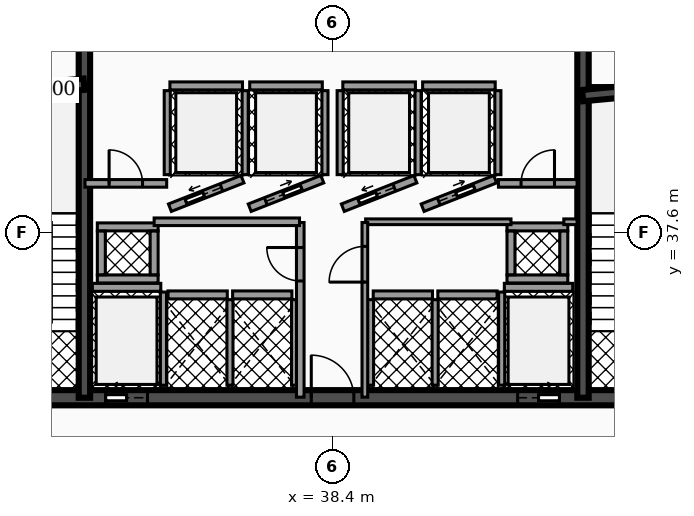
"""IFC4 building model, lengths in metres.
Left out: names, types, materials, properties, quantities, classifications, styles, units other than length and angle.
Written with IfcOpenShell. Run it as: python <this file> out.ifc"""

import sys

from ifc_helpers import new_model, si_unit, direction, frame, frame_2d, origin, place, context, subcontext, project, spatial, rectangle, extrude, element, fill, save


model = new_model("IFC4")
c1 = context("Model", 3, precision=1e-05, world=origin(), true_north=direction((0.0, 1.0)))
c2 = subcontext(c1, "Body", "Model", "MODEL_VIEW")
j1 = project(units=[si_unit("LENGTHUNIT", "METRE"), si_unit("PLANEANGLEUNIT", "RADIAN")], contexts=[c1])
p1 = place(None, origin())
s1 = spatial("IfcSite", under=j1, at=p1, CompositionType="ELEMENT")
p2 = place(p1, origin())
s2 = spatial("IfcBuilding", under=s1, at=p2, CompositionType="ELEMENT")
p3 = place(p2, frame((0.0, 0.0, 88.74)))
s3 = spatial("IfcBuildingStorey", under=s2, at=p3, CompositionType="ELEMENT", Elevation=88.74)
p4 = place(p3, frame((28.4, 33.25, 0.0), z_axis=(0.0, 0.0, 1.0), x_axis=(1.0, 0.0, 0.0)))
e1 = element("IfcWall", 1, at=p4, inside=s3, PredefinedType="SHEAR", context=c2, shape_type="SweptSolid", body=[
    extrude(rectangle(XDim=20.06, YDim=0.4, at=frame_2d((10.03, 0.0))), origin(), (0.0, 0.0, 1.0), 3.82),
])
p5 = place(p4, frame((4.03, 0.0, 0.0)))
e2 = element("IfcOpeningElement", 2, at=p5, cuts=e1, PredefinedType="OPENING", context=c2, shape_type="SweptSolid", body=[
    extrude(rectangle(XDim=1.1, YDim=2.15, at=frame_2d((0.55, 1.075))), frame((0.0, 0.21, 0.0), z_axis=(0.0, -1.0, 0.0), x_axis=(1.0, 0.0, 0.0)), (0.0, 0.0, 1.0), 0.42),
])
p6 = place(p4, frame((14.87, 0.0, 0.0)))
e3 = element("IfcOpeningElement", 3, at=p6, cuts=e1, PredefinedType="OPENING", context=c2, shape_type="SweptSolid", body=[
    extrude(rectangle(XDim=1.1, YDim=2.15, at=frame_2d((0.55, 1.075))), frame((0.0, 0.21, 0.0), z_axis=(0.0, -1.0, 0.0), x_axis=(1.0, 0.0, 0.0)), (0.0, 0.0, 1.0), 0.42),
])
p7 = place(p4, frame((1.31, 0.0, 0.0)))
e4 = element("IfcOpeningElement", 4, at=p7, cuts=e1, PredefinedType="OPENING", context=c2, shape_type="SweptSolid", body=[
    extrude(rectangle(XDim=1.1, YDim=2.2, at=frame_2d((0.55, 1.1))), frame((0.0, 0.21, 0.0), z_axis=(0.0, -1.0, 0.0), x_axis=(1.0, 0.0, 0.0)), (0.0, 0.0, 1.0), 0.42),
])
p8 = place(p4, frame((9.44, 0.0, 0.0)))
e5 = element("IfcOpeningElement", 5, at=p8, cuts=e1, PredefinedType="OPENING", context=c2, shape_type="SweptSolid", body=[
    extrude(rectangle(XDim=1.12, YDim=2.05, at=frame_2d((0.56, 1.025))), frame((0.0, 0.21, 0.0), z_axis=(0.0, -1.0, 0.0), x_axis=(1.0, 0.0, 0.0)), (0.0, 0.0, 1.0), 0.42),
])
p9 = place(p4, frame((17.65, 0.0, 0.0)))
e6 = element("IfcOpeningElement", 6, at=p9, cuts=e1, PredefinedType="OPENING", context=c2, shape_type="SweptSolid", body=[
    extrude(rectangle(XDim=1.1, YDim=2.2, at=frame_2d((0.55, 1.1))), frame((0.0, 0.21, 0.0), z_axis=(0.0, -1.0, 0.0), x_axis=(1.0, 0.0, 0.0)), (0.0, 0.0, 1.0), 0.42),
])
for number, where, z_axis, x_axis in (
    (7, (31.87, 33.25, 0.0), (0.0, 0.0, 1.0), (0.0, 1.0, 0.0)),
    (8, (44.99, 33.25, 0.0), (0.0, 0.0, 1.0), (0.0, 1.0, 0.0)),
):
    element("IfcWall", number, at=place(p3, frame(where, z_axis=z_axis, x_axis=x_axis)), inside=s3, PredefinedType="SHEAR", context=c2, shape_type="SweptSolid", body=[
        extrude(rectangle(XDim=10.2, YDim=0.3, at=frame_2d((5.1, 0.0))), origin(), (0.0, 0.0, 1.0), 3.82),
    ])
p10 = place(p3, frame((28.64, 41.2, 0.0), z_axis=(0.0, 0.0, 1.0), x_axis=(0.995687118776, 0.092774789157, 0.0)))
e9 = element("IfcWall", 9, at=p10, inside=s3, PredefinedType="SHEAR", context=c2, shape_type="SweptSolid", body=[
    extrude(rectangle(XDim=3.234, YDim=0.3, at=frame_2d((1.617, 0.0))), origin(), (0.0, 0.0, 1.0), 3.82),
])
p11 = place(p3, frame((44.98, 41.2, 0.0), z_axis=(0.0, 0.0, 1.0), x_axis=(0.995686468965, 0.09278176286, 0.0)))
e10 = element("IfcWall", 10, at=p11, inside=s3, PredefinedType="SHEAR", context=c2, shape_type="SweptSolid", body=[
    extrude(rectangle(XDim=3.234, YDim=0.3, at=frame_2d((1.617, 0.0))), origin(), (0.0, 0.0, 1.0), 3.82),
])
p12 = place(p3, frame((32.08, 36.155, 0.0), z_axis=(0.0, 0.0, 1.0), x_axis=(1.0, 0.0, 0.0)))
e11 = element("IfcWall", 11, at=p12, inside=s3, PredefinedType="SOLIDWALL", context=c2, shape_type="SweptSolid", body=[
    extrude(rectangle(XDim=1.8, YDim=0.21, at=frame_2d((0.9, 0.0))), origin(), (0.0, 0.0, 1.0), 2.792),
])
p13 = place(p3, frame((33.95, 33.58, 0.0), z_axis=(0.0, 0.0, 1.0), x_axis=(0.0, 1.0, 0.0)))
e12 = element("IfcWall", 12, at=p13, inside=s3, PredefinedType="SOLIDWALL", context=c2, shape_type="SweptSolid", body=[
    extrude(rectangle(XDim=2.45, YDim=0.16, at=frame_2d((1.225, 0.0))), origin(), (0.0, 0.0, 1.0), 2.792),
])
p14 = place(p3, frame((42.92, 36.155, 0.0), z_axis=(0.0, 0.0, 1.0), x_axis=(1.0, 0.0, 0.0)))
e13 = element("IfcWall", 13, at=p14, inside=s3, PredefinedType="SOLIDWALL", context=c2, shape_type="SweptSolid", body=[
    extrude(rectangle(XDim=1.8, YDim=0.21, at=frame_2d((0.9, 0.0))), origin(), (0.0, 0.0, 1.0), 2.792),
])
p15 = place(p3, frame((42.85, 33.58, 0.0), z_axis=(0.0, 0.0, 1.0), x_axis=(0.0, 1.0, 0.0)))
e14 = element("IfcWall", 14, at=p15, inside=s3, PredefinedType="SOLIDWALL", context=c2, shape_type="SweptSolid", body=[
    extrude(rectangle(XDim=2.45, YDim=0.16, at=frame_2d((1.225, 0.0))), origin(), (0.0, 0.0, 1.0), 2.792),
])
p16 = place(p3, frame((34.12, 38.25, 0.0), z_axis=(0.0, 0.0, 1.0), x_axis=(0.930804993012, 0.36551616241, 0.0)))
e15 = element("IfcWall", 15, at=p16, inside=s3, PredefinedType="SOLIDWALL", context=c2, shape_type="SweptSolid", body=[
    extrude(rectangle(XDim=2.052, YDim=0.21, at=frame_2d((1.026, 0.0))), origin(), (0.0, 0.0, 1.0), 2.792),
])
p17 = place(p16, frame((0.455, 0.0, 0.0)))
e16 = element("IfcOpeningElement", 16, at=p17, cuts=e15, PredefinedType="OPENING", context=c2, shape_type="SweptSolid", body=[
    extrude(rectangle(XDim=1.0, YDim=2.1, at=frame_2d((0.5, 1.05))), frame((0.0, 0.115, 0.0), z_axis=(0.0, -1.0, 0.0), x_axis=(1.0, 0.0, 0.0)), (0.0, 0.0, 1.0), 0.23),
])
p18 = place(p3, frame((34.12, 41.455, 0.0), z_axis=(0.0, 0.0, 1.0), x_axis=(1.0, 0.0, 0.0)))
e17 = element("IfcWall", 17, at=p18, inside=s3, PredefinedType="SOLIDWALL", context=c2, shape_type="SweptSolid", body=[
    extrude(rectangle(XDim=1.91, YDim=0.21, at=frame_2d((0.955, 0.0))), origin(), (0.0, 0.0, 1.0), 2.792),
])
for number, where, z_axis, x_axis in (
    (18, (34.05, 39.12, 0.0), (0.0, 0.0, 1.0), (0.0, 1.0, 0.0)),
    (19, (36.1, 39.12, 0.0), (0.0, 0.0, 1.0), (0.0, 1.0, 0.0)),
):
    element("IfcWall", number, at=place(p3, frame(where, z_axis=z_axis, x_axis=x_axis)), inside=s3, PredefinedType="SOLIDWALL", context=c2, shape_type="SweptSolid", body=[
        extrude(rectangle(XDim=2.21, YDim=0.16, at=frame_2d((1.105, 0.0))), origin(), (0.0, 0.0, 1.0), 2.792),
    ])
p19 = place(p3, frame((36.22, 38.25, 0.0), z_axis=(0.0, 0.0, 1.0), x_axis=(0.930804993012, 0.36551616241, 0.0)))
e20 = element("IfcWall", 20, at=p19, inside=s3, PredefinedType="SOLIDWALL", context=c2, shape_type="SweptSolid", body=[
    extrude(rectangle(XDim=2.052, YDim=0.21, at=frame_2d((1.026, 0.0))), origin(), (0.0, 0.0, 1.0), 2.792),
])
p20 = place(p19, frame((0.455, 0.0, 0.0)))
e21 = element("IfcOpeningElement", 21, at=p20, cuts=e20, PredefinedType="OPENING", context=c2, shape_type="SweptSolid", body=[
    extrude(rectangle(XDim=1.0, YDim=2.1, at=frame_2d((0.5, 1.05))), frame((0.0, 0.115, 0.0), z_axis=(0.0, -1.0, 0.0), x_axis=(1.0, 0.0, 0.0)), (0.0, 0.0, 1.0), 0.23),
])
p21 = place(p3, frame((36.22, 41.455, 0.0), z_axis=(0.0, 0.0, 1.0), x_axis=(1.0, 0.0, 0.0)))
e22 = element("IfcWall", 22, at=p21, inside=s3, PredefinedType="SOLIDWALL", context=c2, shape_type="SweptSolid", body=[
    extrude(rectangle(XDim=1.91, YDim=0.21, at=frame_2d((0.955, 0.0))), origin(), (0.0, 0.0, 1.0), 2.792),
])
p22 = place(p3, frame((38.2, 39.12, 0.0), z_axis=(0.0, 0.0, 1.0), x_axis=(0.0, 1.0, 0.0)))
e23 = element("IfcWall", 23, at=p22, inside=s3, PredefinedType="SOLIDWALL", context=c2, shape_type="SweptSolid", body=[
    extrude(rectangle(XDim=2.21, YDim=0.16, at=frame_2d((1.105, 0.0))), origin(), (0.0, 0.0, 1.0), 2.792),
])
p23 = place(p3, frame((38.67, 38.25, 0.0), z_axis=(0.0, 0.0, 1.0), x_axis=(0.930820886763, 0.3654756856, 0.0)))
e24 = element("IfcWall", 24, at=p23, inside=s3, PredefinedType="SOLIDWALL", context=c2, shape_type="SweptSolid", body=[
    extrude(rectangle(XDim=2.052, YDim=0.21, at=frame_2d((1.026, 0.0))), origin(), (0.0, 0.0, 1.0), 2.792),
])
p24 = place(p23, frame((0.455, 0.0, 0.0)))
e25 = element("IfcOpeningElement", 25, at=p24, cuts=e24, PredefinedType="OPENING", context=c2, shape_type="SweptSolid", body=[
    extrude(rectangle(XDim=1.0, YDim=2.1, at=frame_2d((0.5, 1.05))), frame((0.0, 0.115, 0.0), z_axis=(0.0, -1.0, 0.0), x_axis=(1.0, 0.0, 0.0)), (0.0, 0.0, 1.0), 0.23),
])
p25 = place(p3, frame((38.67, 41.455, 0.0), z_axis=(0.0, 0.0, 1.0), x_axis=(1.0, 0.0, 0.0)))
e26 = element("IfcWall", 26, at=p25, inside=s3, PredefinedType="SOLIDWALL", context=c2, shape_type="SweptSolid", body=[
    extrude(rectangle(XDim=1.91, YDim=0.21, at=frame_2d((0.955, 0.0))), origin(), (0.0, 0.0, 1.0), 2.792),
])
for number, where, z_axis, x_axis in (
    (27, (38.6, 39.12, 0.0), (0.0, 0.0, 1.0), (0.0, 1.0, 0.0)),
    (28, (40.65, 39.12, 0.0), (0.0, 0.0, 1.0), (0.0, 1.0, 0.0)),
):
    element("IfcWall", number, at=place(p3, frame(where, z_axis=z_axis, x_axis=x_axis)), inside=s3, PredefinedType="SOLIDWALL", context=c2, shape_type="SweptSolid", body=[
        extrude(rectangle(XDim=2.21, YDim=0.16, at=frame_2d((1.105, 0.0))), origin(), (0.0, 0.0, 1.0), 2.792),
    ])
p26 = place(p3, frame((40.77, 38.25, 0.0), z_axis=(0.0, 0.0, 1.0), x_axis=(0.930804993012, 0.36551616241, 0.0)))
e29 = element("IfcWall", 29, at=p26, inside=s3, PredefinedType="SOLIDWALL", context=c2, shape_type="SweptSolid", body=[
    extrude(rectangle(XDim=2.052, YDim=0.21, at=frame_2d((1.026, 0.0))), origin(), (0.0, 0.0, 1.0), 2.792),
])
p27 = place(p26, frame((0.455, 0.0, 0.0)))
e30 = element("IfcOpeningElement", 30, at=p27, cuts=e29, PredefinedType="OPENING", context=c2, shape_type="SweptSolid", body=[
    extrude(rectangle(XDim=1.0, YDim=2.1, at=frame_2d((0.5, 1.05))), frame((0.0, 0.115, 0.0), z_axis=(0.0, -1.0, 0.0), x_axis=(1.0, 0.0, 0.0)), (0.0, 0.0, 1.0), 0.23),
])
p28 = place(p3, frame((40.77, 41.455, 0.0), z_axis=(0.0, 0.0, 1.0), x_axis=(1.0, 0.0, 0.0)))
e31 = element("IfcWall", 31, at=p28, inside=s3, PredefinedType="SOLIDWALL", context=c2, shape_type="SweptSolid", body=[
    extrude(rectangle(XDim=1.91, YDim=0.21, at=frame_2d((0.955, 0.0))), origin(), (0.0, 0.0, 1.0), 2.792),
])
p29 = place(p3, frame((42.75, 39.12, 0.0), z_axis=(0.0, 0.0, 1.0), x_axis=(0.0, 1.0, 0.0)))
e32 = element("IfcWall", 32, at=p29, inside=s3, PredefinedType="SOLIDWALL", context=c2, shape_type="SweptSolid", body=[
    extrude(rectangle(XDim=2.21, YDim=0.16, at=frame_2d((1.105, 0.0))), origin(), (0.0, 0.0, 1.0), 2.792),
])
p30 = place(p3, frame((34.07, 35.955, 0.0), z_axis=(0.0, 0.0, 1.0), x_axis=(1.0, 0.0, 0.0)))
e33 = element("IfcWall", 33, at=p30, inside=s3, PredefinedType="SOLIDWALL", context=c2, shape_type="SweptSolid", body=[
    extrude(rectangle(XDim=1.56, YDim=0.21, at=frame_2d((0.78, 0.0))), origin(), (0.0, 0.0, 1.0), 2.792),
])
p31 = place(p3, frame((35.7, 33.58, 0.0), z_axis=(0.0, 0.0, 1.0), x_axis=(0.0, 1.0, 0.0)))
e34 = element("IfcWall", 34, at=p31, inside=s3, PredefinedType="SOLIDWALL", context=c2, shape_type="SweptSolid", body=[
    extrude(rectangle(XDim=2.25, YDim=0.16, at=frame_2d((1.125, 0.0))), origin(), (0.0, 0.0, 1.0), 2.792),
])
p32 = place(p3, frame((35.77, 35.955, 0.0), z_axis=(0.0, 0.0, 1.0), x_axis=(1.0, 0.0, 0.0)))
e35 = element("IfcWall", 35, at=p32, inside=s3, PredefinedType="SOLIDWALL", context=c2, shape_type="SweptSolid", body=[
    extrude(rectangle(XDim=1.56, YDim=0.21, at=frame_2d((0.78, 0.0))), origin(), (0.0, 0.0, 1.0), 2.792),
])
p33 = place(p3, frame((37.4, 33.58, 0.0), z_axis=(0.0, 0.0, 1.0), x_axis=(0.0, 1.0, 0.0)))
e36 = element("IfcWall", 36, at=p33, inside=s3, PredefinedType="SOLIDWALL", context=c2, shape_type="SweptSolid", body=[
    extrude(rectangle(XDim=2.25, YDim=0.16, at=frame_2d((1.125, 0.0))), origin(), (0.0, 0.0, 1.0), 2.792),
])
p34 = place(p3, frame((39.47, 35.955, 0.0), z_axis=(0.0, 0.0, 1.0), x_axis=(1.0, 0.0, 0.0)))
e37 = element("IfcWall", 37, at=p34, inside=s3, PredefinedType="SOLIDWALL", context=c2, shape_type="SweptSolid", body=[
    extrude(rectangle(XDim=1.56, YDim=0.21, at=frame_2d((0.78, 0.0))), origin(), (0.0, 0.0, 1.0), 2.792),
])
for number, where, z_axis, x_axis in (
    (38, (39.4, 33.58, 0.0), (0.0, 0.0, 1.0), (0.0, 1.0, 0.0)),
    (39, (41.1, 33.58, 0.0), (0.0, 0.0, 1.0), (0.0, 1.0, 0.0)),
):
    element("IfcWall", number, at=place(p3, frame(where, z_axis=z_axis, x_axis=x_axis)), inside=s3, PredefinedType="SOLIDWALL", context=c2, shape_type="SweptSolid", body=[
        extrude(rectangle(XDim=2.25, YDim=0.16, at=frame_2d((1.125, 0.0))), origin(), (0.0, 0.0, 1.0), 2.792),
    ])
p35 = place(p3, frame((41.17, 35.955, 0.0), z_axis=(0.0, 0.0, 1.0), x_axis=(1.0, 0.0, 0.0)))
e40 = element("IfcWall", 40, at=p35, inside=s3, PredefinedType="SOLIDWALL", context=c2, shape_type="SweptSolid", body=[
    extrude(rectangle(XDim=1.56, YDim=0.21, at=frame_2d((0.78, 0.0))), origin(), (0.0, 0.0, 1.0), 2.792),
])
for number, where, z_axis, x_axis in (
    (41, (32.21, 36.375, 0.0), (0.0, 0.0, 1.0), (1.0, 0.0, 0.0)),
    (42, (32.21, 37.745, 0.0), (0.0, 0.0, 1.0), (1.0, 0.0, 0.0)),
):
    element("IfcWall", number, at=place(p3, frame(where, z_axis=z_axis, x_axis=x_axis)), inside=s3, PredefinedType="SOLIDWALL", context=c2, shape_type="SweptSolid", body=[
        extrude(rectangle(XDim=1.6, YDim=0.21, at=frame_2d((0.8, 0.0))), origin(), (0.0, 0.0, 1.0), 3.82),
    ])
for number, where, z_axis, x_axis in (
    (43, (32.315, 36.485, 0.0), (0.0, 0.0, 1.0), (0.0, 1.0, 0.0)),
    (44, (33.705, 36.485, 0.0), (0.0, 0.0, 1.0), (0.0, 1.0, 0.0)),
):
    element("IfcWall", number, at=place(p3, frame(where, z_axis=z_axis, x_axis=x_axis)), inside=s3, PredefinedType="SOLIDWALL", context=c2, shape_type="SweptSolid", body=[
        extrude(rectangle(XDim=1.15, YDim=0.21, at=frame_2d((0.575, 0.0))), origin(), (0.0, 0.0, 1.0), 3.82),
    ])
for number, where, z_axis, x_axis in (
    (45, (42.99, 36.375, 0.0), (0.0, 0.0, 1.0), (1.0, 0.0, 0.0)),
    (46, (42.99, 37.745, 0.0), (0.0, 0.0, 1.0), (1.0, 0.0, 0.0)),
):
    element("IfcWall", number, at=place(p3, frame(where, z_axis=z_axis, x_axis=x_axis)), inside=s3, PredefinedType="SOLIDWALL", context=c2, shape_type="SweptSolid", body=[
        extrude(rectangle(XDim=1.6, YDim=0.21, at=frame_2d((0.8, 0.0))), origin(), (0.0, 0.0, 1.0), 3.82),
    ])
for number, where, z_axis, x_axis in (
    (47, (43.095, 36.485, 0.0), (0.0, 0.0, 1.0), (0.0, 1.0, 0.0)),
    (48, (44.485, 36.485, 0.0), (0.0, 0.0, 1.0), (0.0, 1.0, 0.0)),
):
    element("IfcWall", number, at=place(p3, frame(where, z_axis=z_axis, x_axis=x_axis)), inside=s3, PredefinedType="SOLIDWALL", context=c2, shape_type="SweptSolid", body=[
        extrude(rectangle(XDim=1.15, YDim=0.21, at=frame_2d((0.575, 0.0))), origin(), (0.0, 0.0, 1.0), 3.82),
    ])
p36 = place(p3, frame((37.55, 33.265, 0.0), z_axis=(0.0, 0.0, 1.0), x_axis=(0.0, 1.0, 0.0)))
e49 = element("IfcWall", 49, at=p36, inside=s3, PredefinedType="PARTITIONING", context=c2, shape_type="SweptSolid", body=[
    extrude(rectangle(XDim=4.595, YDim=0.2, at=frame_2d((2.298, 0.0))), origin(), (0.0, 0.0, 1.0), 2.777),
])
p37 = place(p36, frame((3.058, 0.0, 0.0)))
e50 = element("IfcOpeningElement", 50, at=p37, cuts=e49, PredefinedType="OPENING", context=c2, shape_type="SweptSolid", body=[
    extrude(rectangle(XDim=0.88, YDim=2.05, at=frame_2d((0.44, 1.025))), frame((0.0, 0.11, 0.0), z_axis=(0.0, -1.0, 0.0), x_axis=(1.0, 0.0, 0.0)), (0.0, 0.0, 1.0), 0.22),
])
p38 = place(p3, frame((33.705, 37.88, 0.0), z_axis=(0.0, 0.0, 1.0), x_axis=(1.0, 0.0, 0.0)))
e51 = element("IfcWall", 51, at=p38, inside=s3, PredefinedType="PARTITIONING", context=c2, shape_type="SweptSolid", body=[
    extrude(rectangle(XDim=3.825, YDim=0.2, at=frame_2d((1.913, 0.0))), origin(), (0.0, 0.0, 1.0), 2.777),
])
p39 = place(p3, frame((31.885, 38.89, 0.0), z_axis=(0.0, 0.0, 1.0), x_axis=(1.0, 0.0, 0.0)))
e52 = element("IfcWall", 52, at=p39, inside=s3, PredefinedType="PARTITIONING", context=c2, shape_type="SweptSolid", body=[
    extrude(rectangle(XDim=2.15, YDim=0.2, at=frame_2d((1.075, 0.0))), origin(), (0.0, 0.0, 1.0), 2.777),
])
p40 = place(p39, frame((0.635, 0.0, 0.0)))
e53 = element("IfcOpeningElement", 53, at=p40, cuts=e52, PredefinedType="OPENING", context=c2, shape_type="SweptSolid", body=[
    extrude(rectangle(XDim=0.88, YDim=2.05, at=frame_2d((0.44, 1.025))), frame((0.0, 0.11, 0.0), z_axis=(0.0, -1.0, 0.0), x_axis=(1.0, 0.0, 0.0)), (0.0, 0.0, 1.0), 0.22),
])
p41 = place(p3, frame((42.765, 38.89, 0.0), z_axis=(0.0, 0.0, 1.0), x_axis=(1.0, 0.0, 0.0)))
e54 = element("IfcWall", 54, at=p41, inside=s3, PredefinedType="PARTITIONING", context=c2, shape_type="SweptSolid", body=[
    extrude(rectangle(XDim=2.07, YDim=0.2, at=frame_2d((1.035, 0.0))), origin(), (0.0, 0.0, 1.0), 2.777),
])
p42 = place(p41, frame((0.595, 0.0, 0.0)))
e55 = element("IfcOpeningElement", 55, at=p42, cuts=e54, PredefinedType="OPENING", context=c2, shape_type="SweptSolid", body=[
    extrude(rectangle(XDim=0.88, YDim=2.05, at=frame_2d((0.44, 1.025))), frame((0.0, 0.11, 0.0), z_axis=(0.0, -1.0, 0.0), x_axis=(1.0, 0.0, 0.0)), (0.0, 0.0, 1.0), 0.22),
])
p43 = place(p3, frame((39.27, 37.88, 0.0), z_axis=(0.0, 0.0, 1.0), x_axis=(1.0, 0.0, 0.0)))
e56 = element("IfcWall", 56, at=p43, inside=s3, PredefinedType="PARTITIONING", context=c2, shape_type="SweptSolid", body=[
    extrude(rectangle(XDim=3.825, YDim=0.15, at=frame_2d((1.913, 0.0))), origin(), (0.0, 0.0, 1.0), 2.777),
])
p44 = place(p3, frame((44.485, 37.88, 0.0), z_axis=(0.0, 0.0, 1.0), x_axis=(1.0, 0.0, 0.0)))
e57 = element("IfcWall", 57, at=p44, inside=s3, PredefinedType="PARTITIONING", context=c2, shape_type="SweptSolid", body=[
    extrude(rectangle(XDim=0.35, YDim=0.15, at=frame_2d((0.175, 0.0))), origin(), (0.0, 0.0, 1.0), 2.777),
])
p45 = place(p3, frame((39.25, 33.265, 0.0), z_axis=(0.0, 0.0, 1.0), x_axis=(0.0, 1.0, 0.0)))
e58 = element("IfcWall", 58, at=p45, inside=s3, PredefinedType="PARTITIONING", context=c2, shape_type="SweptSolid", body=[
    extrude(rectangle(XDim=4.595, YDim=0.15, at=frame_2d((2.298, 0.0))), origin(), (0.0, 0.0, 1.0), 2.777),
])
p46 = place(p45, frame((3.028, 0.0, 0.0)))
e59 = element("IfcOpeningElement", 59, at=p46, cuts=e58, PredefinedType="OPENING", context=c2, shape_type="SweptSolid", body=[
    extrude(rectangle(XDim=0.94, YDim=2.05, at=frame_2d((0.47, 1.025))), frame((0.0, 0.085, 0.0), z_axis=(0.0, -1.0, 0.0), x_axis=(1.0, 0.0, 0.0)), (0.0, 0.0, 1.0), 0.17),
])
p47 = place(p5, origin())
e60 = element("IfcDoor", 60, at=p47, inside=s3, OperationType="SLIDING_TO_LEFT", PredefinedType="DOOR", context=c2, shape_type="SweptSolid", body=[
    extrude(rectangle(XDim=1.1, YDim=2.15, at=frame_2d((0.55, 1.075))), frame((0.0, 0.025, 0.0), z_axis=(0.0, -1.0, 0.0), x_axis=(1.0, 0.0, 0.0)), (0.0, 0.0, 1.0), 0.05),
])
fill(e2, e60)
p48 = place(p6, origin())
e61 = element("IfcDoor", 61, at=p48, inside=s3, OperationType="SLIDING_TO_RIGHT", PredefinedType="DOOR", context=c2, shape_type="SweptSolid", body=[
    extrude(rectangle(XDim=1.1, YDim=2.15, at=frame_2d((0.55, 1.075))), frame((0.0, 0.025, 0.0), z_axis=(0.0, -1.0, 0.0), x_axis=(1.0, 0.0, 0.0)), (0.0, 0.0, 1.0), 0.05),
])
fill(e3, e61)
p49 = place(p17, origin())
e62 = element("IfcDoor", 62, at=p49, inside=s3, OperationType="SLIDING_TO_LEFT", PredefinedType="DOOR", context=c2, shape_type="SweptSolid", body=[
    extrude(rectangle(XDim=1.0, YDim=2.1, at=frame_2d((0.5, 1.05))), frame((0.0, 0.025, 0.0), z_axis=(0.0, -1.0, 0.0), x_axis=(1.0, 0.0, 0.0)), (0.0, 0.0, 1.0), 0.05),
])
fill(e16, e62)
p50 = place(p20, origin())
e63 = element("IfcDoor", 63, at=p50, inside=s3, OperationType="SLIDING_TO_RIGHT", PredefinedType="DOOR", context=c2, shape_type="SweptSolid", body=[
    extrude(rectangle(XDim=1.0, YDim=2.1, at=frame_2d((0.5, 1.05))), frame((0.0, 0.025, 0.0), z_axis=(0.0, -1.0, 0.0), x_axis=(1.0, 0.0, 0.0)), (0.0, 0.0, 1.0), 0.05),
])
fill(e21, e63)
p51 = place(p24, origin())
e64 = element("IfcDoor", 64, at=p51, inside=s3, OperationType="SLIDING_TO_LEFT", PredefinedType="DOOR", context=c2, shape_type="SweptSolid", body=[
    extrude(rectangle(XDim=1.0, YDim=2.1, at=frame_2d((0.5, 1.05))), frame((0.0, 0.025, 0.0), z_axis=(0.0, -1.0, 0.0), x_axis=(1.0, 0.0, 0.0)), (0.0, 0.0, 1.0), 0.05),
])
fill(e25, e64)
p52 = place(p27, origin())
e65 = element("IfcDoor", 65, at=p52, inside=s3, OperationType="SLIDING_TO_RIGHT", PredefinedType="DOOR", context=c2, shape_type="SweptSolid", body=[
    extrude(rectangle(XDim=1.0, YDim=2.1, at=frame_2d((0.5, 1.05))), frame((0.0, 0.025, 0.0), z_axis=(0.0, -1.0, 0.0), x_axis=(1.0, 0.0, 0.0)), (0.0, 0.0, 1.0), 0.05),
])
fill(e30, e65)
p53 = place(p8, origin())
e66 = element("IfcDoor", 66, at=p53, inside=s3, OperationType="SINGLE_SWING_LEFT", PredefinedType="DOOR", context=c2, shape_type="SweptSolid", body=[
    extrude(rectangle(XDim=1.12, YDim=2.05, at=frame_2d((0.56, 1.025))), frame((0.0, 0.025, 0.0), z_axis=(0.0, -1.0, 0.0), x_axis=(1.0, 0.0, 0.0)), (0.0, 0.0, 1.0), 0.05),
])
fill(e5, e66)
p54 = place(p37, origin())
e67 = element("IfcDoor", 67, at=p54, inside=s3, OperationType="SINGLE_SWING_RIGHT", PredefinedType="DOOR", context=c2, shape_type="SweptSolid", body=[
    extrude(rectangle(XDim=0.88, YDim=2.05, at=frame_2d((0.44, 1.025))), frame((0.0, 0.025, 0.0), z_axis=(0.0, -1.0, 0.0), x_axis=(1.0, 0.0, 0.0)), (0.0, 0.0, 1.0), 0.05),
])
fill(e50, e67)
p55 = place(p40, origin())
e68 = element("IfcDoor", 68, at=p55, inside=s3, OperationType="SINGLE_SWING_LEFT", PredefinedType="DOOR", context=c2, shape_type="SweptSolid", body=[
    extrude(rectangle(XDim=0.88, YDim=2.05, at=frame_2d((0.44, 1.025))), frame((0.0, 0.025, 0.0), z_axis=(0.0, -1.0, 0.0), x_axis=(1.0, 0.0, 0.0)), (0.0, 0.0, 1.0), 0.05),
])
fill(e53, e68)
p56 = place(p42, origin())
e69 = element("IfcDoor", 69, at=p56, inside=s3, OperationType="SINGLE_SWING_RIGHT", PredefinedType="DOOR", context=c2, shape_type="SweptSolid", body=[
    extrude(rectangle(XDim=0.88, YDim=2.05, at=frame_2d((0.44, 1.025))), frame((0.0, 0.025, 0.0), z_axis=(0.0, -1.0, 0.0), x_axis=(1.0, 0.0, 0.0)), (0.0, 0.0, 1.0), 0.05),
])
fill(e55, e69)
p57 = place(p46, origin())
e70 = element("IfcDoor", 70, at=p57, inside=s3, OperationType="SINGLE_SWING_LEFT", PredefinedType="DOOR", context=c2, shape_type="SweptSolid", body=[
    extrude(rectangle(XDim=0.94, YDim=2.05, at=frame_2d((0.47, 1.025))), frame((0.0, 0.025, 0.0), z_axis=(0.0, -1.0, 0.0), x_axis=(1.0, 0.0, 0.0)), (0.0, 0.0, 1.0), 0.05),
])
fill(e59, e70)
save(model, sys.argv[1])
